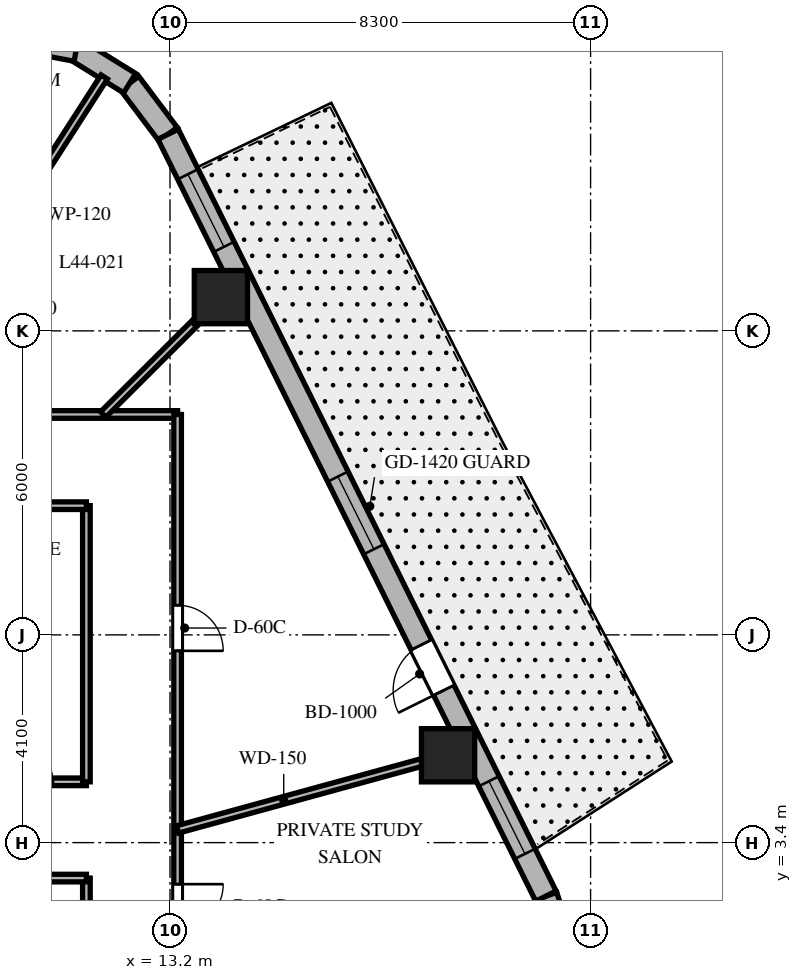
"""IFC4 building model, lengths in metres.
Left out: names, types, materials, properties, quantities, classifications, styles, units other than length and angle.
Written with IfcOpenShell. Run it as: python <this file> out.ifc"""

import sys

from ifc_helpers import new_model, si_unit, direction, frame, frame_2d, origin, origin_2d, place, context, subcontext, project, spatial, rectangle, extrude, element, fill, save


model = new_model("IFC4")
c1 = context("Model", 3, precision=1e-05, world=origin(), true_north=direction((0.0, 1.0)))
c2 = subcontext(c1, "Body", "Model", "MODEL_VIEW")
j1 = project(units=[si_unit("LENGTHUNIT", "METRE"), si_unit("PLANEANGLEUNIT", "RADIAN")], contexts=[c1])
p1 = place(None, origin())
s1 = spatial("IfcSite", under=j1, at=p1, CompositionType="ELEMENT")
p2 = place(p1, origin())
s2 = spatial("IfcBuilding", under=s1, at=p2, CompositionType="ELEMENT")
p3 = place(p2, frame((0.0, 0.0, 179.3)))
s3 = spatial("IfcBuildingStorey", under=s2, at=p3, CompositionType="ELEMENT", Elevation=179.3)
for number, where, z_axis, x_axis in (
    (1, (18.687, 5.124, 0.0), (0.0, 0.0, 1.0), (1.0, 0.0, 0.0)),
    (2, (14.204, 14.166, 0.0), (0.0, 0.0, 1.0), (1.0, 0.0, 0.0)),
):
    element("IfcColumn", number, at=place(p3, frame(where, z_axis=z_axis, x_axis=x_axis)), inside=s3, PredefinedType="COLUMN", context=c2, shape_type="SweptSolid", body=[
        extrude(rectangle(XDim=1.05, YDim=1.05, at=origin_2d()), origin(), (0.0, 0.0, 1.0), 3.7),
    ])
p4 = place(p3, frame((20.911, 1.484, 0.0), z_axis=(0.0, 0.0, 1.0), x_axis=(-0.321623334353, 0.946867694453, 0.0)))
e3 = element("IfcWall", 3, at=p4, inside=s3, PredefinedType="SOLIDWALL", context=c2, shape_type="SweptSolid", body=[
    extrude(rectangle(XDim=0.909, YDim=0.45, at=frame_2d((0.454, 0.0))), origin(), (0.0, 0.0, 1.0), 3.4),
])
p5 = place(p3, frame((13.162, 17.381, 0.0), z_axis=(0.0, 0.0, 1.0), x_axis=(-0.601515770517, 0.798860925205, 0.0)))
e4 = element("IfcWall", 4, at=p5, inside=s3, PredefinedType="SOLIDWALL", context=c2, shape_type="SweptSolid", body=[
    extrude(rectangle(XDim=1.262, YDim=0.45, at=frame_2d((0.631, 0.0))), origin(), (0.0, 0.0, 1.0), 3.4),
])
p6 = place(p3, frame((12.403, 18.389, 0.0), z_axis=(0.0, 0.0, 1.0), x_axis=(-0.849795170926, 0.527113049991, 0.0)))
e5 = element("IfcWall", 5, at=p6, inside=s3, PredefinedType="SOLIDWALL", context=c2, shape_type="SweptSolid", body=[
    extrude(rectangle(XDim=1.241, YDim=0.45, at=frame_2d((0.62, 0.0))), origin(), (0.0, 0.0, 1.0), 3.4),
])
p7 = place(p3, frame((11.349, 19.043, 0.0), z_axis=(0.0, 0.0, 1.0), x_axis=(-0.982931267051, 0.183973161772, 0.0)))
e6 = element("IfcWall", 6, at=p7, inside=s3, PredefinedType="SOLIDWALL", context=c2, shape_type="SweptSolid", body=[
    extrude(rectangle(XDim=1.262, YDim=0.45, at=frame_2d((0.631, 0.0))), origin(), (0.0, 0.0, 1.0), 3.4),
])
p8 = place(p3, frame((20.618, 2.344, 0.0), z_axis=(0.0, 0.0, 1.0), x_axis=(-0.444243691097, 0.895905990002, 0.0)))
e7 = element("IfcWall", 7, at=p8, inside=s3, PredefinedType="SOLIDWALL", context=c2, shape_type="SweptSolid", body=[
    extrude(rectangle(XDim=16.784, YDim=0.45, at=frame_2d((8.392, 0.0))), origin(), (0.0, 0.0, 1.0), 3.4),
])
p9 = place(p8, frame((4.535, 0.0, 0.0)))
e8 = element("IfcOpeningElement", 8, at=p9, cuts=e7, PredefinedType="OPENING", context=c2, shape_type="SweptSolid", body=[
    extrude(rectangle(XDim=1.0, YDim=2.15, at=frame_2d((0.5, 1.075))), frame((0.0, 0.235, 0.0), z_axis=(0.0, -1.0, 0.0), x_axis=(1.0, 0.0, 0.0)), (0.0, 0.0, 1.0), 0.47),
])
p10 = place(p8, frame((0.931, 0.0, 0.8)))
e9 = element("IfcOpeningElement", 9, at=p10, cuts=e7, PredefinedType="OPENING", context=c2, shape_type="SweptSolid", body=[
    extrude(rectangle(XDim=1.6, YDim=1.75, at=frame_2d((0.8, 0.875))), frame((0.0, 0.235, 0.0), z_axis=(0.0, -1.0, 0.0), x_axis=(1.0, 0.0, 0.0)), (0.0, 0.0, 1.0), 0.47),
])
p11 = place(p8, frame((7.642, 0.0, 0.8)))
e10 = element("IfcOpeningElement", 10, at=p11, cuts=e7, PredefinedType="OPENING", context=c2, shape_type="SweptSolid", body=[
    extrude(rectangle(XDim=1.6, YDim=1.75, at=frame_2d((0.8, 0.875))), frame((0.0, 0.235, 0.0), z_axis=(0.0, -1.0, 0.0), x_axis=(1.0, 0.0, 0.0)), (0.0, 0.0, 1.0), 0.47),
])
p12 = place(p8, frame((14.303, 0.0, 0.8)))
e11 = element("IfcOpeningElement", 11, at=p12, cuts=e7, PredefinedType="OPENING", context=c2, shape_type="SweptSolid", body=[
    extrude(rectangle(XDim=1.6, YDim=1.75, at=frame_2d((0.8, 0.875))), frame((0.0, 0.235, 0.0), z_axis=(0.0, -1.0, 0.0), x_axis=(1.0, 0.0, 0.0)), (0.0, 0.0, 1.0), 0.47),
])
p13 = place(p3, frame((-13.35, 11.85, 0.0), z_axis=(0.0, 0.0, 1.0), x_axis=(1.0, 0.0, 0.0)))
e12 = element("IfcWall", 12, at=p13, inside=s3, PredefinedType="PARTITIONING", context=c2, shape_type="SweptSolid", body=[
    extrude(rectangle(XDim=26.7, YDim=0.15, at=frame_2d((13.35, 0.0))), origin(), (0.0, 0.0, 1.0), 2.84),
])
p14 = place(p13, frame((22.7, 0.0, 0.0)))
e13 = element("IfcOpeningElement", 13, at=p14, cuts=e12, PredefinedType="OPENING", context=c2, shape_type="SweptSolid", body=[
    extrude(rectangle(XDim=0.9, YDim=2.03, at=frame_2d((0.45, 1.015))), frame((0.0, 0.085, 0.0), z_axis=(0.0, -1.0, 0.0), x_axis=(1.0, 0.0, 0.0)), (0.0, 0.0, 1.0), 0.17),
])
p15 = place(p13, frame((18.523, 0.0, 0.0)))
e14 = element("IfcOpeningElement", 14, at=p15, cuts=e12, PredefinedType="OPENING", context=c2, shape_type="SweptSolid", body=[
    extrude(rectangle(XDim=0.95, YDim=2.03, at=frame_2d((0.475, 1.015))), frame((0.0, 0.085, 0.0), z_axis=(0.0, -1.0, 0.0), x_axis=(1.0, 0.0, 0.0)), (0.0, 0.0, 1.0), 0.17),
])
p16 = place(p13, frame((14.469, 0.0, 0.0)))
e15 = element("IfcOpeningElement", 15, at=p16, cuts=e12, PredefinedType="OPENING", context=c2, shape_type="SweptSolid", body=[
    extrude(rectangle(XDim=0.95, YDim=2.03, at=frame_2d((0.475, 1.015))), frame((0.0, 0.085, 0.0), z_axis=(0.0, -1.0, 0.0), x_axis=(1.0, 0.0, 0.0)), (0.0, 0.0, 1.0), 0.17),
])
p17 = place(p13, frame((10.314, 0.0, 0.0)))
e16 = element("IfcOpeningElement", 16, at=p17, cuts=e12, PredefinedType="OPENING", context=c2, shape_type="SweptSolid", body=[
    extrude(rectangle(XDim=0.95, YDim=2.03, at=frame_2d((0.475, 1.015))), frame((0.0, 0.085, 0.0), z_axis=(0.0, -1.0, 0.0), x_axis=(1.0, 0.0, 0.0)), (0.0, 0.0, 1.0), 0.17),
])
p18 = place(p13, frame((6.061, 0.0, 0.0)))
e17 = element("IfcOpeningElement", 17, at=p18, cuts=e12, PredefinedType="OPENING", context=c2, shape_type="SweptSolid", body=[
    extrude(rectangle(XDim=0.95, YDim=2.03, at=frame_2d((0.475, 1.015))), frame((0.0, 0.085, 0.0), z_axis=(0.0, -1.0, 0.0), x_axis=(1.0, 0.0, 0.0)), (0.0, 0.0, 1.0), 0.17),
])
p19 = place(p13, frame((1.886, 0.0, 0.0)))
e18 = element("IfcOpeningElement", 18, at=p19, cuts=e12, PredefinedType="OPENING", context=c2, shape_type="SweptSolid", body=[
    extrude(rectangle(XDim=0.9, YDim=2.03, at=frame_2d((0.45, 1.015))), frame((0.0, 0.085, 0.0), z_axis=(0.0, -1.0, 0.0), x_axis=(1.0, 0.0, 0.0)), (0.0, 0.0, 1.0), 0.17),
])
p20 = place(p3, frame((13.35, 11.85, 0.0), z_axis=(0.0, 0.0, 1.0), x_axis=(0.0, -1.0, 0.0)))
e19 = element("IfcWall", 19, at=p20, inside=s3, PredefinedType="PARTITIONING", context=c2, shape_type="SweptSolid", body=[
    extrude(rectangle(XDim=23.7, YDim=0.15, at=frame_2d((11.85, 0.0))), origin(), (0.0, 0.0, 1.0), 2.84),
])
p21 = place(p20, frame((9.27, 0.0, 0.0)))
e20 = element("IfcOpeningElement", 20, at=p21, cuts=e19, PredefinedType="OPENING", context=c2, shape_type="SweptSolid", body=[
    extrude(rectangle(XDim=0.9, YDim=2.03, at=frame_2d((0.45, 1.015))), frame((0.0, 0.085, 0.0), z_axis=(0.0, -1.0, 0.0), x_axis=(1.0, 0.0, 0.0)), (0.0, 0.0, 1.0), 0.17),
])
p22 = place(p20, frame((3.765, 0.0, 0.0)))
e21 = element("IfcOpeningElement", 21, at=p22, cuts=e19, PredefinedType="OPENING", context=c2, shape_type="SweptSolid", body=[
    extrude(rectangle(XDim=0.9, YDim=2.03, at=frame_2d((0.45, 1.015))), frame((0.0, 0.085, 0.0), z_axis=(0.0, -1.0, 0.0), x_axis=(1.0, 0.0, 0.0)), (0.0, 0.0, 1.0), 0.17),
])
p23 = place(p20, frame((20.662, 0.0, 0.0)))
e22 = element("IfcOpeningElement", 22, at=p23, cuts=e19, PredefinedType="OPENING", context=c2, shape_type="SweptSolid", body=[
    extrude(rectangle(XDim=0.9, YDim=2.03, at=frame_2d((0.45, 1.015))), frame((0.0, 0.085, 0.0), z_axis=(0.0, -1.0, 0.0), x_axis=(1.0, 0.0, 0.0)), (0.0, 0.0, 1.0), 0.17),
])
p24 = place(p20, frame((16.055, 0.0, 0.0)))
e23 = element("IfcOpeningElement", 23, at=p24, cuts=e19, PredefinedType="OPENING", context=c2, shape_type="SweptSolid", body=[
    extrude(rectangle(XDim=0.95, YDim=2.03, at=frame_2d((0.475, 1.015))), frame((0.0, 0.085, 0.0), z_axis=(0.0, -1.0, 0.0), x_axis=(1.0, 0.0, 0.0)), (0.0, 0.0, 1.0), 0.17),
])
p25 = place(p20, frame((12.315, 0.0, 0.0)))
e24 = element("IfcOpeningElement", 24, at=p25, cuts=e19, PredefinedType="OPENING", context=c2, shape_type="SweptSolid", body=[
    extrude(rectangle(XDim=0.9, YDim=2.03, at=frame_2d((0.45, 1.015))), frame((0.0, 0.085, 0.0), z_axis=(0.0, -1.0, 0.0), x_axis=(1.0, 0.0, 0.0)), (0.0, 0.0, 1.0), 0.17),
])
p26 = place(p3, frame((11.55, -10.05, 0.0), z_axis=(0.0, 0.0, 1.0), x_axis=(0.0, 1.0, 0.0)))
e25 = element("IfcWall", 25, at=p26, inside=s3, PredefinedType="PARTITIONING", context=c2, shape_type="SweptSolid", body=[
    extrude(rectangle(XDim=12.75, YDim=0.15, at=frame_2d((6.375, 0.0))), origin(), (0.0, 0.0, 1.0), 2.84),
])
p27 = place(p26, frame((5.95, 0.0, 0.0)))
e26 = element("IfcOpeningElement", 26, at=p27, cuts=e25, PredefinedType="OPENING", context=c2, shape_type="SweptSolid", body=[
    extrude(rectangle(XDim=0.85, YDim=2.03, at=frame_2d((0.425, 1.015))), frame((0.0, 0.085, 0.0), z_axis=(0.0, -1.0, 0.0), x_axis=(1.0, 0.0, 0.0)), (0.0, 0.0, 1.0), 0.17),
])
p28 = place(p3, frame((11.55, 2.7, 0.0), z_axis=(0.0, 0.0, 1.0), x_axis=(-1.0, 0.0, 0.0)))
e27 = element("IfcWall", 27, at=p28, inside=s3, PredefinedType="PARTITIONING", context=c2, shape_type="SweptSolid", body=[
    extrude(rectangle(XDim=2.175, YDim=0.15, at=frame_2d((1.087, 0.0))), origin(), (0.0, 0.0, 1.0), 3.4),
])
p29 = place(p3, frame((9.375, 4.6, 0.0), z_axis=(0.0, 0.0, 1.0), x_axis=(1.0, 0.0, 0.0)))
e28 = element("IfcWall", 28, at=p29, inside=s3, PredefinedType="PARTITIONING", context=c2, shape_type="SweptSolid", body=[
    extrude(rectangle(XDim=2.175, YDim=0.15, at=frame_2d((1.087, 0.0))), origin(), (0.0, 0.0, 1.0), 3.4),
])
p30 = place(p29, frame((0.663, 0.0, 0.0)))
e29 = element("IfcOpeningElement", 29, at=p30, cuts=e28, PredefinedType="OPENING", context=c2, shape_type="SweptSolid", body=[
    extrude(rectangle(XDim=0.85, YDim=2.03, at=frame_2d((0.425, 1.015))), frame((0.0, 0.085, 0.0), z_axis=(0.0, -1.0, 0.0), x_axis=(1.0, 0.0, 0.0)), (0.0, 0.0, 1.0), 0.17),
])
p31 = place(p3, frame((11.55, 4.6, 0.0), z_axis=(0.0, 0.0, 1.0), x_axis=(0.0, 1.0, 0.0)))
e30 = element("IfcWall", 30, at=p31, inside=s3, PredefinedType="PARTITIONING", context=c2, shape_type="SweptSolid", body=[
    extrude(rectangle(XDim=5.45, YDim=0.15, at=frame_2d((2.725, 0.0))), origin(), (0.0, 0.0, 1.0), 2.84),
])
p32 = place(p3, frame((11.55, 10.05, 0.0), z_axis=(0.0, 0.0, 1.0), x_axis=(-1.0, 0.0, 0.0)))
e31 = element("IfcWall", 31, at=p32, inside=s3, PredefinedType="PARTITIONING", context=c2, shape_type="SweptSolid", body=[
    extrude(rectangle(XDim=9.65, YDim=0.15, at=frame_2d((4.825, 0.0))), origin(), (0.0, 0.0, 1.0), 2.84),
])
p33 = place(p3, frame((13.35, 3.661, 0.0), z_axis=(0.0, 0.0, 1.0), x_axis=(0.964397145454, 0.264458211898, 0.0)))
e32 = element("IfcWall", 32, at=p33, inside=s3, PredefinedType="PARTITIONING", context=c2, shape_type="SweptSolid", body=[
    extrude(rectangle(XDim=6.039, YDim=0.15, at=frame_2d((3.019, 0.0))), origin(), (0.0, 0.0, 1.0), 2.64),
])
p34 = place(p3, frame((11.882, 11.85, 0.0), z_axis=(0.0, 0.0, 1.0), x_axis=(0.708037373639, 0.706174962407, 0.0)))
e33 = element("IfcWall", 33, at=p34, inside=s3, PredefinedType="PARTITIONING", context=c2, shape_type="SweptSolid", body=[
    extrude(rectangle(XDim=3.802, YDim=0.15, at=frame_2d((1.901, 0.0))), origin(), (0.0, 0.0, 1.0), 2.64),
])
p35 = place(p3, frame((7.619, 11.85, 0.0), z_axis=(0.0, 0.0, 1.0), x_axis=(0.540829263478, 0.841132396098, 0.0)))
e34 = element("IfcWall", 34, at=p35, inside=s3, PredefinedType="PARTITIONING", context=c2, shape_type="SweptSolid", body=[
    extrude(rectangle(XDim=7.919, YDim=0.15, at=frame_2d((3.959, 0.0))), origin(), (0.0, 0.0, 1.0), 2.64),
])
p36 = place(p9, origin())
e35 = element("IfcDoor", 35, at=p36, inside=s3, OperationType="SINGLE_SWING_LEFT", PredefinedType="DOOR", context=c2, shape_type="SweptSolid", body=[
    extrude(rectangle(XDim=1.0, YDim=2.15, at=frame_2d((0.5, 1.075))), frame((0.0, 0.025, 0.0), z_axis=(0.0, -1.0, 0.0), x_axis=(1.0, 0.0, 0.0)), (0.0, 0.0, 1.0), 0.05),
])
fill(e8, e35)
p37 = place(p10, origin())
e36 = element("IfcWindow", 36, at=p37, inside=s3, PartitioningType="SINGLE_PANEL", PredefinedType="WINDOW", context=c2, shape_type="SweptSolid", body=[
    extrude(rectangle(XDim=1.6, YDim=1.75, at=frame_2d((0.8, 0.875))), frame((0.0, 0.03, 0.0), z_axis=(0.0, -1.0, 0.0), x_axis=(1.0, 0.0, 0.0)), (0.0, 0.0, 1.0), 0.06),
])
fill(e9, e36)
p38 = place(p11, origin())
e37 = element("IfcWindow", 37, at=p38, inside=s3, PartitioningType="SINGLE_PANEL", PredefinedType="WINDOW", context=c2, shape_type="SweptSolid", body=[
    extrude(rectangle(XDim=1.6, YDim=1.75, at=frame_2d((0.8, 0.875))), frame((0.0, 0.03, 0.0), z_axis=(0.0, -1.0, 0.0), x_axis=(1.0, 0.0, 0.0)), (0.0, 0.0, 1.0), 0.06),
])
fill(e10, e37)
p39 = place(p12, origin())
e38 = element("IfcWindow", 38, at=p39, inside=s3, PartitioningType="SINGLE_PANEL", PredefinedType="WINDOW", context=c2, shape_type="SweptSolid", body=[
    extrude(rectangle(XDim=1.6, YDim=1.75, at=frame_2d((0.8, 0.875))), frame((0.0, 0.03, 0.0), z_axis=(0.0, -1.0, 0.0), x_axis=(1.0, 0.0, 0.0)), (0.0, 0.0, 1.0), 0.06),
])
fill(e11, e38)
p40 = place(p30, origin())
e39 = element("IfcDoor", 39, at=p40, inside=s3, OperationType="SINGLE_SWING_LEFT", PredefinedType="DOOR", context=c2, shape_type="SweptSolid", body=[
    extrude(rectangle(XDim=0.85, YDim=2.03, at=frame_2d((0.425, 1.015))), frame((0.0, 0.025, 0.0), z_axis=(0.0, -1.0, 0.0), x_axis=(1.0, 0.0, 0.0)), (0.0, 0.0, 1.0), 0.05),
])
fill(e29, e39)
p41 = place(p21, origin())
e40 = element("IfcDoor", 40, at=p41, inside=s3, OperationType="SINGLE_SWING_LEFT", PredefinedType="DOOR", context=c2, shape_type="SweptSolid", body=[
    extrude(rectangle(XDim=0.9, YDim=2.03, at=frame_2d((0.45, 1.015))), frame((0.0, 0.025, 0.0), z_axis=(0.0, -1.0, 0.0), x_axis=(1.0, 0.0, 0.0)), (0.0, 0.0, 1.0), 0.05),
])
fill(e20, e40)
p42 = place(p22, origin())
e41 = element("IfcDoor", 41, at=p42, inside=s3, OperationType="SINGLE_SWING_RIGHT", PredefinedType="DOOR", context=c2, shape_type="SweptSolid", body=[
    extrude(rectangle(XDim=0.9, YDim=2.03, at=frame_2d((0.45, 1.015))), frame((0.0, 0.025, 0.0), z_axis=(0.0, -1.0, 0.0), x_axis=(1.0, 0.0, 0.0)), (0.0, 0.0, 1.0), 0.05),
])
fill(e21, e41)
save(model, sys.argv[1])
